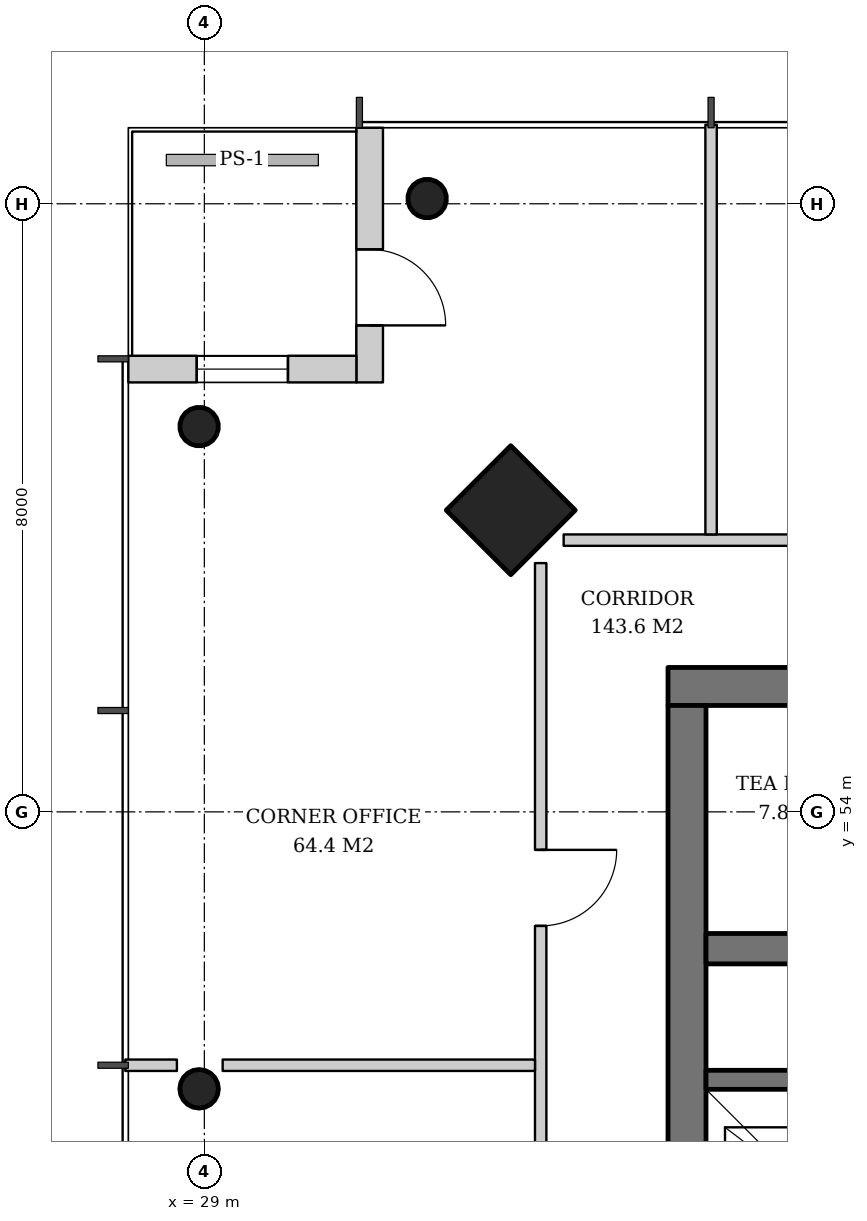
"""IFC4 building model, lengths in metres.
Left out: names, types, materials, properties, quantities, classifications, styles, units other than length and angle.
Written with IfcOpenShell. Run it as: python <this file> out.ifc"""

import sys

from ifc_helpers import new_model, si_unit, direction, frame, frame_2d, origin, origin_2d, place, context, subcontext, project, spatial, rectangle, hollow_circle, extrude, element, fill, save


model = new_model("IFC4")
c1 = context("Model", 3, precision=1e-05, world=origin(), true_north=direction((0.0, 1.0)))
c2 = subcontext(c1, "Body", "Model", "MODEL_VIEW")
j1 = project(units=[si_unit("LENGTHUNIT", "METRE"), si_unit("PLANEANGLEUNIT", "RADIAN")], contexts=[c1])
p1 = place(None, origin())
s1 = spatial("IfcSite", under=j1, at=p1, CompositionType="ELEMENT")
p2 = place(p1, origin())
s2 = spatial("IfcBuilding", under=s1, at=p2, CompositionType="ELEMENT")
p3 = place(p2, frame((0.0, 0.0, 268.0)))
s3 = spatial("IfcBuildingStorey", under=s2, at=p3, CompositionType="ELEMENT", Elevation=268.0)
p4 = place(p3, frame((32.993, 58.007, 0.0), z_axis=(0.031898107953, -0.031898107953, 0.998981992539), x_axis=(0.707106781187, 0.707106781187, 0.0)))
e1 = element("IfcColumn", 1, at=p4, inside=s3, PredefinedType="COLUMN", context=c2, shape_type="SweptSolid", body=[
    extrude(rectangle(XDim=1.2, YDim=1.2, at=origin_2d()), origin(), (0.0, 0.0, 1.0), 3.804),
])
for number, where, z_axis, x_axis in (
    (2, (31.893, 62.107, 0.0), (0.032, -0.032, 0.999), (0.707, 0.707, 0.0)),
    (3, (28.893, 59.107, 0.0), (0.032, -0.032, 0.999), (0.707, 0.707, 0.0)),
):
    element("IfcColumn", number, at=place(p3, frame(where, z_axis=z_axis, x_axis=x_axis)), inside=s3, PredefinedType="COLUMN", context=c2, shape_type="SweptSolid", body=[
        extrude(hollow_circle(Radius=0.254, WallThickness=0.02, at=origin_2d()), origin(), (0.0, 0.0, 1.0), 3.804),
    ])
p5 = place(p3, frame((28.893, 50.369, 0.0), z_axis=(0.031976680097, -0.010658893366, 0.999431778523), x_axis=(0.316227766017, 0.948683298051, 0.0)))
e4 = element("IfcColumn", 4, at=p5, inside=s3, PredefinedType="COLUMN", context=c2, shape_type="SweptSolid", body=[
    extrude(hollow_circle(Radius=0.254, WallThickness=0.02, at=origin_2d()), origin(), (0.0, 0.0, 1.0), 3.802),
])
p6 = place(p3, frame((35.1, 55.65, 0.0), z_axis=(0.0, 0.0, 1.0), x_axis=(1.0, 0.0, 0.0)))
e5 = element("IfcWall", 5, at=p6, inside=s3, PredefinedType="SHEAR", context=c2, shape_type="SweptSolid", body=[
    extrude(rectangle(XDim=19.8, YDim=0.5, at=frame_2d((9.9, 0.0))), origin(), (0.0, 0.0, 1.0), 3.8),
])
p7 = place(p6, frame((14.54, 0.0, 0.0)))
e6 = element("IfcOpeningElement", 6, at=p7, cuts=e5, PredefinedType="OPENING", context=c2, shape_type="SweptSolid", body=[
    extrude(rectangle(XDim=1.0, YDim=2.1, at=frame_2d((0.5, 1.05))), frame((0.0, 0.26, 0.0), z_axis=(0.0, -1.0, 0.0), x_axis=(1.0, 0.0, 0.0)), (0.0, 0.0, 1.0), 0.52),
])
p8 = place(p6, frame((1.75, 0.0, 0.0)))
e7 = element("IfcOpeningElement", 7, at=p8, cuts=e5, PredefinedType="OPENING", context=c2, shape_type="SweptSolid", body=[
    extrude(rectangle(XDim=1.0, YDim=2.1, at=frame_2d((0.5, 1.05))), frame((0.0, 0.26, 0.0), z_axis=(0.0, -1.0, 0.0), x_axis=(1.0, 0.0, 0.0)), (0.0, 0.0, 1.0), 0.52),
])
p9 = place(p6, frame((3.705, 0.0, 0.0)))
e8 = element("IfcOpeningElement", 8, at=p9, cuts=e5, PredefinedType="OPENING", context=c2, shape_type="SweptSolid", body=[
    extrude(rectangle(XDim=1.0, YDim=2.1, at=frame_2d((0.5, 1.05))), frame((0.0, 0.26, 0.0), z_axis=(0.0, -1.0, 0.0), x_axis=(1.0, 0.0, 0.0)), (0.0, 0.0, 1.0), 0.52),
])
p10 = place(p3, frame((35.35, 36.6, 0.0), z_axis=(0.0, 0.0, 1.0), x_axis=(0.0, 1.0, 0.0)))
e9 = element("IfcWall", 9, at=p10, inside=s3, PredefinedType="SHEAR", context=c2, shape_type="SweptSolid", body=[
    extrude(rectangle(XDim=18.8, YDim=0.5, at=frame_2d((9.4, 0.0))), origin(), (0.0, 0.0, 1.0), 3.8),
])
p11 = place(p10, frame((8.5, 0.0, 0.0)))
e10 = element("IfcOpeningElement", 10, at=p11, cuts=e9, PredefinedType="OPENING", context=c2, shape_type="SweptSolid", body=[
    extrude(rectangle(XDim=1.8, YDim=2.4, at=frame_2d((0.9, 1.2))), frame((0.0, 0.26, 0.0), z_axis=(0.0, -1.0, 0.0), x_axis=(1.0, 0.0, 0.0)), (0.0, 0.0, 1.0), 0.52),
])
p12 = place(p3, frame((35.6, 52.2, 0.0), z_axis=(0.0, 0.0, 1.0), x_axis=(1.0, 0.0, 0.0)))
e11 = element("IfcWall", 11, at=p12, inside=s3, PredefinedType="SHEAR", context=c2, shape_type="SweptSolid", body=[
    extrude(rectangle(XDim=18.8, YDim=0.4, at=frame_2d((9.4, 0.0))), origin(), (0.0, 0.0, 1.0), 3.8),
])
p13 = place(p3, frame((31.175, 63.0, 0.0), z_axis=(0.0, 0.0, 1.0), x_axis=(0.0, -1.0, 0.0)))
e12 = element("IfcWall", 12, at=p13, inside=s3, PredefinedType="SOLIDWALL", context=c2, shape_type="SweptSolid", body=[
    extrude(rectangle(XDim=3.35, YDim=0.35, at=frame_2d((1.675, 0.0))), origin(), (0.0, 0.0, 1.0), 3.62),
])
p14 = place(p13, frame((1.6, 0.0, 0.0)))
e13 = element("IfcOpeningElement", 13, at=p14, cuts=e12, PredefinedType="OPENING", context=c2, shape_type="SweptSolid", body=[
    extrude(rectangle(XDim=1.0, YDim=2.4, at=frame_2d((0.5, 1.2))), frame((0.0, 0.185, 0.0), z_axis=(0.0, -1.0, 0.0), x_axis=(1.0, 0.0, 0.0)), (0.0, 0.0, 1.0), 0.37),
])
p15 = place(p3, frame((31.0, 59.825, 0.0), z_axis=(0.0, 0.0, 1.0), x_axis=(-1.0, 0.0, 0.0)))
e14 = element("IfcWall", 14, at=p15, inside=s3, PredefinedType="SOLIDWALL", context=c2, shape_type="SweptSolid", body=[
    extrude(rectangle(XDim=3.0, YDim=0.35, at=frame_2d((1.5, 0.0))), origin(), (0.0, 0.0, 1.0), 3.62),
])
p16 = place(p15, frame((0.9, 0.0, 0.6)))
e15 = element("IfcOpeningElement", 15, at=p16, cuts=e14, PredefinedType="OPENING", context=c2, shape_type="SweptSolid", body=[
    extrude(rectangle(XDim=1.2, YDim=2.55, at=frame_2d((0.6, 1.275))), frame((0.0, 0.185, 0.0), z_axis=(0.0, -1.0, 0.0), x_axis=(1.0, 0.0, 0.0)), (0.0, 0.0, 1.0), 0.37),
])
p17 = place(p3, frame((35.6, 50.475, 0.0), z_axis=(0.0, 0.0, 1.0), x_axis=(1.0, 0.0, 0.0)))
e16 = element("IfcWall", 16, at=p17, inside=s3, PredefinedType="SHEAR", context=c2, shape_type="SweptSolid", body=[
    extrude(rectangle(XDim=11.1, YDim=0.25, at=frame_2d((5.55, 0.0))), origin(), (0.0, 0.0, 1.0), 3.8),
])
p18 = place(p3, frame((56.273, 57.575, 0.0), z_axis=(0.0, 0.0, 1.0), x_axis=(-1.0, 0.0, 0.0)))
e17 = element("IfcWall", 17, at=p18, inside=s3, PredefinedType="PARTITIONING", context=c2, shape_type="SweptSolid", body=[
    extrude(rectangle(XDim=22.546, YDim=0.15, at=frame_2d((11.273, 0.0))), origin(), (0.0, 0.0, 1.0), 3.02),
])
p19 = place(p18, frame((3.773, 0.0, 0.0)))
e18 = element("IfcOpeningElement", 18, at=p19, cuts=e17, PredefinedType="OPENING", context=c2, shape_type="SweptSolid", body=[
    extrude(rectangle(XDim=1.0, YDim=2.1, at=frame_2d((0.5, 1.05))), frame((0.0, 0.085, 0.0), z_axis=(0.0, -1.0, 0.0), x_axis=(1.0, 0.0, 0.0)), (0.0, 0.0, 1.0), 0.17),
])
p20 = place(p18, frame((8.04, 0.0, 0.0)))
e19 = element("IfcOpeningElement", 19, at=p20, cuts=e17, PredefinedType="OPENING", context=c2, shape_type="SweptSolid", body=[
    extrude(rectangle(XDim=1.8, YDim=2.4, at=frame_2d((0.9, 1.2))), frame((0.0, 0.085, 0.0), z_axis=(0.0, -1.0, 0.0), x_axis=(1.0, 0.0, 0.0)), (0.0, 0.0, 1.0), 0.17),
])
p21 = place(p18, frame((17.773, 0.0, 0.0)))
e20 = element("IfcOpeningElement", 20, at=p21, cuts=e17, PredefinedType="OPENING", context=c2, shape_type="SweptSolid", body=[
    extrude(rectangle(XDim=1.0, YDim=2.1, at=frame_2d((0.5, 1.05))), frame((0.0, 0.085, 0.0), z_axis=(0.0, -1.0, 0.0), x_axis=(1.0, 0.0, 0.0)), (0.0, 0.0, 1.0), 0.17),
])
p22 = place(p3, frame((35.667, 57.65, 0.0), z_axis=(0.0, 0.0, 1.0), x_axis=(0.0, 1.0, 0.0)))
e21 = element("IfcWall", 21, at=p22, inside=s3, PredefinedType="PARTITIONING", context=c2, shape_type="SweptSolid", body=[
    extrude(rectangle(XDim=5.39, YDim=0.15, at=frame_2d((2.695, 0.0))), origin(), (0.0, 0.0, 1.0), 3.12),
])
p23 = place(p3, frame((33.425, 57.273, 0.0), z_axis=(0.0, 0.0, 1.0), x_axis=(0.0, -1.0, 0.0)))
e22 = element("IfcWall", 22, at=p23, inside=s3, PredefinedType="PARTITIONING", context=c2, shape_type="SweptSolid", body=[
    extrude(rectangle(XDim=22.546, YDim=0.15, at=frame_2d((11.273, 0.0))), origin(), (0.0, 0.0, 1.0), 3.02),
])
p24 = place(p23, frame((3.773, 0.0, 0.0)))
e23 = element("IfcOpeningElement", 23, at=p24, cuts=e22, PredefinedType="OPENING", context=c2, shape_type="SweptSolid", body=[
    extrude(rectangle(XDim=1.0, YDim=2.1, at=frame_2d((0.5, 1.05))), frame((0.0, 0.085, 0.0), z_axis=(0.0, -1.0, 0.0), x_axis=(1.0, 0.0, 0.0)), (0.0, 0.0, 1.0), 0.17),
])
p25 = place(p23, frame((8.54, 0.0, 0.0)))
e24 = element("IfcOpeningElement", 24, at=p25, cuts=e22, PredefinedType="OPENING", context=c2, shape_type="SweptSolid", body=[
    extrude(rectangle(XDim=0.8, YDim=2.1, at=frame_2d((0.4, 1.05))), frame((0.0, 0.085, 0.0), z_axis=(0.0, -1.0, 0.0), x_axis=(1.0, 0.0, 0.0)), (0.0, 0.0, 1.0), 0.17),
])
p26 = place(p23, frame((13.106, 0.0, 0.0)))
e25 = element("IfcOpeningElement", 25, at=p26, cuts=e22, PredefinedType="OPENING", context=c2, shape_type="SweptSolid", body=[
    extrude(rectangle(XDim=1.0, YDim=2.1, at=frame_2d((0.5, 1.05))), frame((0.0, 0.085, 0.0), z_axis=(0.0, -1.0, 0.0), x_axis=(1.0, 0.0, 0.0)), (0.0, 0.0, 1.0), 0.17),
])
p27 = place(p23, frame((17.873, 0.0, 0.0)))
e26 = element("IfcOpeningElement", 26, at=p27, cuts=e22, PredefinedType="OPENING", context=c2, shape_type="SweptSolid", body=[
    extrude(rectangle(XDim=0.8, YDim=2.1, at=frame_2d((0.4, 1.05))), frame((0.0, 0.085, 0.0), z_axis=(0.0, -1.0, 0.0), x_axis=(1.0, 0.0, 0.0)), (0.0, 0.0, 1.0), 0.17),
])
p28 = place(p3, frame((33.35, 50.667, 0.0), z_axis=(0.0, 0.0, 1.0), x_axis=(-1.0, 0.0, 0.0)))
e27 = element("IfcWall", 27, at=p28, inside=s3, PredefinedType="PARTITIONING", context=c2, shape_type="SweptSolid", body=[
    extrude(rectangle(XDim=4.109, YDim=0.15, at=frame_2d((2.055, 0.0))), origin(), (0.0, 0.0, 1.0), 3.62),
])
p29 = place(p3, frame((28.639, 50.667, 0.0), z_axis=(0.0, 0.0, 1.0), x_axis=(-1.0, 0.0, 0.0)))
e28 = element("IfcWall", 28, at=p29, inside=s3, PredefinedType="PARTITIONING", context=c2, shape_type="SweptSolid", body=[
    extrude(rectangle(XDim=0.679, YDim=0.15, at=frame_2d((0.339, 0.0))), origin(), (0.0, 0.0, 1.0), 3.62),
])
p30 = place(p14, origin())
e29 = element("IfcDoor", 29, at=p30, inside=s3, OperationType="SINGLE_SWING_RIGHT", PredefinedType="DOOR", context=c2, shape_type="SweptSolid", body=[
    extrude(rectangle(XDim=1.0, YDim=2.4, at=frame_2d((0.5, 1.2))), frame((0.0, 0.025, 0.0), z_axis=(0.0, -1.0, 0.0), x_axis=(1.0, 0.0, 0.0)), (0.0, 0.0, 1.0), 0.05),
])
fill(e13, e29)
p31 = place(p16, origin())
e30 = element("IfcWindow", 30, at=p31, inside=s3, PartitioningType="SINGLE_PANEL", PredefinedType="WINDOW", context=c2, shape_type="SweptSolid", body=[
    extrude(rectangle(XDim=1.2, YDim=2.55, at=frame_2d((0.6, 1.275))), frame((0.0, 0.03, 0.0), z_axis=(0.0, -1.0, 0.0), x_axis=(1.0, 0.0, 0.0)), (0.0, 0.0, 1.0), 0.06),
])
fill(e15, e30)
p32 = place(p24, origin())
e31 = element("IfcDoor", 31, at=p32, inside=s3, OperationType="SINGLE_SWING_LEFT", PredefinedType="DOOR", context=c2, shape_type="SweptSolid", body=[
    extrude(rectangle(XDim=1.0, YDim=2.1, at=frame_2d((0.5, 1.05))), frame((0.0, 0.025, 0.0), z_axis=(0.0, -1.0, 0.0), x_axis=(1.0, 0.0, 0.0)), (0.0, 0.0, 1.0), 0.05),
])
fill(e23, e31)
save(model, sys.argv[1])
